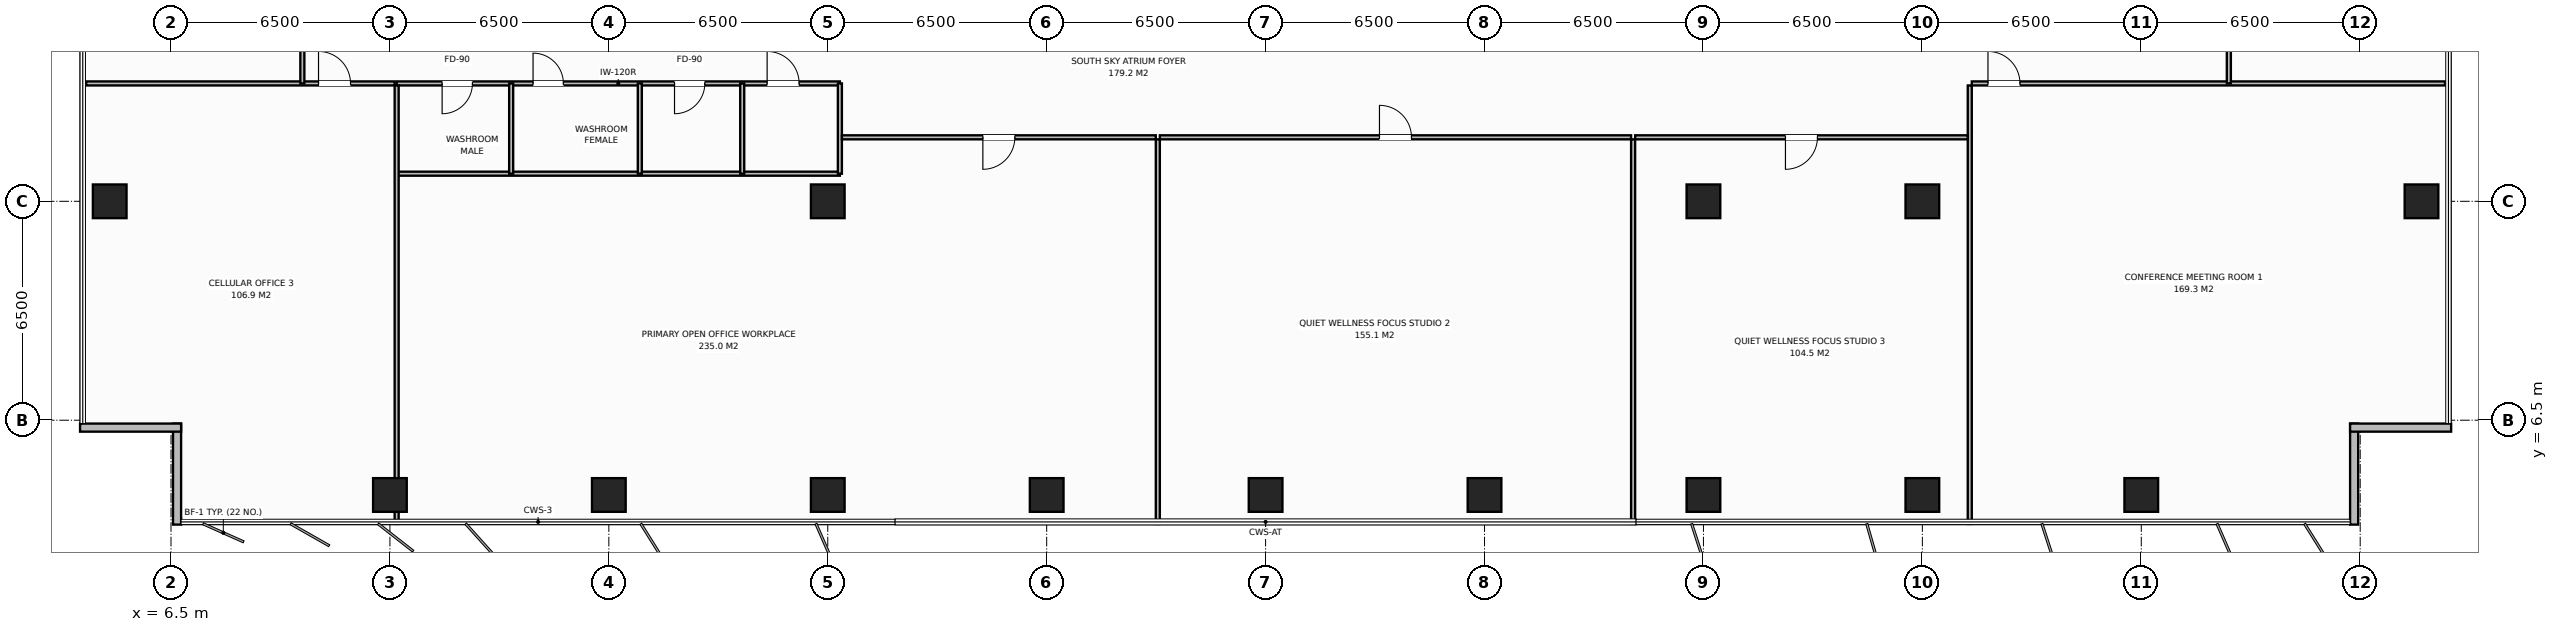
"""IFC4 building model, lengths in metres.
Left out: names, types, materials, properties, quantities, classifications, styles, units other than length and angle.
Written with IfcOpenShell. Run it as: python <this file> out.ifc"""

import sys

from ifc_helpers import new_model, si_unit, direction, frame, frame_2d, origin, origin_2d, place, context, subcontext, project, spatial, rectangle, extrude, element, fill, save


model = new_model("IFC4")
c1 = context("Model", 3, precision=1e-05, world=origin(), true_north=direction((0.0, 1.0)))
c2 = subcontext(c1, "Body", "Model", "MODEL_VIEW")
j1 = project(units=[si_unit("LENGTHUNIT", "METRE"), si_unit("PLANEANGLEUNIT", "RADIAN")], contexts=[c1])
p1 = place(None, origin())
s1 = spatial("IfcSite", under=j1, at=p1, CompositionType="ELEMENT")
p2 = place(p1, origin())
s2 = spatial("IfcBuilding", under=s1, at=p2, CompositionType="ELEMENT")
p3 = place(p2, frame((0.0, 0.0, 155.6)))
s3 = spatial("IfcBuildingStorey", under=s2, at=p3, CompositionType="ELEMENT", Elevation=155.6)
for number, where, z_axis, x_axis in (
    (1, (58.5, 13.0, 0.0), (0.0, 0.0, 1.0), (1.0, 0.0, 0.0)),
    (2, (26.0, 13.0, 0.0), (0.0, 0.0, 1.0), (1.0, 0.0, 0.0)),
    (3, (52.0, 13.0, 0.0), (0.0, 0.0, 1.0), (1.0, 0.0, 0.0)),
    (4, (13.0, 4.28, 0.0), (0.0, 0.0, 1.0), (1.0, 0.0, 0.0)),
    (5, (19.5, 4.28, 0.0), (0.0, 0.0, 1.0), (1.0, 0.0, 0.0)),
    (6, (26.0, 4.28, 0.0), (0.0, 0.0, 1.0), (1.0, 0.0, 0.0)),
    (7, (32.5, 4.28, 0.0), (0.0, 0.0, 1.0), (1.0, 0.0, 0.0)),
    (8, (39.0, 4.28, 0.0), (0.0, 0.0, 1.0), (1.0, 0.0, 0.0)),
    (9, (45.5, 4.28, 0.0), (0.0, 0.0, 1.0), (1.0, 0.0, 0.0)),
    (10, (52.0, 4.28, 0.0), (0.0, 0.0, 1.0), (1.0, 0.0, 0.0)),
    (11, (58.5, 4.28, 0.0), (0.0, 0.0, 1.0), (1.0, 0.0, 0.0)),
    (12, (65.0, 4.28, 0.0), (0.0, 0.0, 1.0), (1.0, 0.0, 0.0)),
    (13, (4.68, 13.0, 0.0), (0.0, 0.0, 1.0), (1.0, 0.0, 0.0)),
    (14, (73.32, 13.0, 0.0), (0.0, 0.0, 1.0), (1.0, 0.0, 0.0)),
):
    element("IfcColumn", number, at=place(p3, frame(where, z_axis=z_axis, x_axis=x_axis)), inside=s3, PredefinedType="COLUMN", context=c2, shape_type="SweptSolid", body=[
        extrude(rectangle(XDim=1.0, YDim=1.0, at=origin_2d()), origin(), (0.0, 0.0, 1.0), 3.8),
    ])
for number, where, z_axis, x_axis in (
    (15, (6.68, 3.4, 0.0), (0.0, 0.0, 1.0), (0.0, 1.0, 0.0)),
    (16, (6.8, 6.28, 0.0), (0.0, 0.0, 1.0), (-1.0, 0.0, 0.0)),
    (17, (71.32, 6.4, 0.0), (0.0, 0.0, 1.0), (0.0, -1.0, 0.0)),
    (18, (74.2, 6.28, 0.0), (0.0, 0.0, 1.0), (-1.0, 0.0, 0.0)),
):
    element("IfcWall", number, at=place(p3, frame(where, z_axis=z_axis, x_axis=x_axis)), inside=s3, PredefinedType="STANDARD", context=c2, shape_type="SweptSolid", body=[
        extrude(rectangle(XDim=3.0, YDim=0.24, at=frame_2d((1.5, 0.0))), origin(), (0.0, 0.0, 1.0), 3.572),
    ])
p4 = place(p3, frame((13.2, 16.5, 0.0), z_axis=(0.0, 0.0, 1.0), x_axis=(1.0, 0.0, 0.0)))
e19 = element("IfcWall", 19, at=p4, inside=s3, PredefinedType="PARTITIONING", context=c2, shape_type="SweptSolid", body=[
    extrude(rectangle(XDim=13.16, YDim=0.12, at=frame_2d((6.58, 0.0))), origin(), (0.0, 0.0, 1.0), 3.572),
])
p5 = place(p4, frame((1.35, 0.0, 0.0)))
e20 = element("IfcOpeningElement", 20, at=p5, cuts=e19, PredefinedType="OPENING", context=c2, shape_type="SweptSolid", body=[
    extrude(rectangle(XDim=0.9, YDim=2.15, at=frame_2d((0.45, 1.075))), frame((0.0, 0.07, 0.0), z_axis=(0.0, -1.0, 0.0), x_axis=(1.0, 0.0, 0.0)), (0.0, 0.0, 1.0), 0.14),
])
p6 = place(p4, frame((4.05, 0.0, 0.0)))
e21 = element("IfcOpeningElement", 21, at=p6, cuts=e19, PredefinedType="OPENING", context=c2, shape_type="SweptSolid", body=[
    extrude(rectangle(XDim=0.9, YDim=2.15, at=frame_2d((0.45, 1.075))), frame((0.0, 0.07, 0.0), z_axis=(0.0, -1.0, 0.0), x_axis=(1.0, 0.0, 0.0)), (0.0, 0.0, 1.0), 0.14),
])
p7 = place(p4, frame((8.25, 0.0, 0.0)))
e22 = element("IfcOpeningElement", 22, at=p7, cuts=e19, PredefinedType="OPENING", context=c2, shape_type="SweptSolid", body=[
    extrude(rectangle(XDim=0.9, YDim=2.15, at=frame_2d((0.45, 1.075))), frame((0.0, 0.07, 0.0), z_axis=(0.0, -1.0, 0.0), x_axis=(1.0, 0.0, 0.0)), (0.0, 0.0, 1.0), 0.14),
])
p8 = place(p4, frame((11.0, 0.0, 0.0)))
e23 = element("IfcOpeningElement", 23, at=p8, cuts=e19, PredefinedType="OPENING", context=c2, shape_type="SweptSolid", body=[
    extrude(rectangle(XDim=0.95, YDim=2.15, at=frame_2d((0.475, 1.075))), frame((0.0, 0.07, 0.0), z_axis=(0.0, -1.0, 0.0), x_axis=(1.0, 0.0, 0.0)), (0.0, 0.0, 1.0), 0.14),
])
p9 = place(p3, frame((13.2, 13.82, 0.0), z_axis=(0.0, 0.0, 1.0), x_axis=(1.0, 0.0, 0.0)))
e24 = element("IfcWall", 24, at=p9, inside=s3, PredefinedType="PARTITIONING", context=c2, shape_type="SweptSolid", body=[
    extrude(rectangle(XDim=13.16, YDim=0.12, at=frame_2d((6.58, 0.0))), origin(), (0.0, 0.0, 1.0), 3.572),
])
for number, where, z_axis, x_axis in (
    (25, (16.6, 13.82, 0.0), (0.0, 0.0, 1.0), (0.0, 1.0, 0.0)),
    (26, (20.42, 13.82, 0.0), (0.0, 0.0, 1.0), (0.0, 1.0, 0.0)),
    (27, (23.46, 13.82, 0.0), (0.0, 0.0, 1.0), (0.0, 1.0, 0.0)),
    (28, (26.36, 13.82, 0.0), (0.0, 0.0, 1.0), (0.0, 1.0, 0.0)),
):
    element("IfcWall", number, at=place(p3, frame(where, z_axis=z_axis, x_axis=x_axis)), inside=s3, PredefinedType="PARTITIONING", context=c2, shape_type="SweptSolid", body=[
        extrude(rectangle(XDim=2.68, YDim=0.12, at=frame_2d((1.34, 0.0))), origin(), (0.0, 0.0, 1.0), 3.572),
    ])
p10 = place(p3, frame((13.2, 3.42, 0.0), z_axis=(0.0, 0.0, 1.0), x_axis=(0.0, 1.0, 0.0)))
e29 = element("IfcWall", 29, at=p10, inside=s3, PredefinedType="PARTITIONING", context=c2, shape_type="SweptSolid", body=[
    extrude(rectangle(XDim=13.02, YDim=0.12, at=frame_2d((6.51, 0.0))), origin(), (0.0, 0.0, 1.0), 3.022),
])
p11 = place(p3, frame((3.98, 16.5, 0.0), z_axis=(0.0, 0.0, 1.0), x_axis=(1.0, 0.0, 0.0)))
e30 = element("IfcWall", 30, at=p11, inside=s3, PredefinedType="PARTITIONING", context=c2, shape_type="SweptSolid", body=[
    extrude(rectangle(XDim=9.16, YDim=0.12, at=frame_2d((4.58, 0.0))), origin(), (0.0, 0.0, 1.0), 3.572),
])
p12 = place(p11, frame((6.9, 0.0, 0.0)))
e31 = element("IfcOpeningElement", 31, at=p12, cuts=e30, PredefinedType="OPENING", context=c2, shape_type="SweptSolid", body=[
    extrude(rectangle(XDim=0.95, YDim=2.15, at=frame_2d((0.475, 1.075))), frame((0.0, 0.07, 0.0), z_axis=(0.0, -1.0, 0.0), x_axis=(1.0, 0.0, 0.0)), (0.0, 0.0, 1.0), 0.14),
])
p13 = place(p3, frame((35.8, 3.42, 0.0), z_axis=(0.0, 0.0, 1.0), x_axis=(0.0, 1.0, 0.0)))
e32 = element("IfcWall", 32, at=p13, inside=s3, PredefinedType="PARTITIONING", context=c2, shape_type="SweptSolid", body=[
    extrude(rectangle(XDim=11.42, YDim=0.12, at=frame_2d((5.71, 0.0))), origin(), (0.0, 0.0, 1.0), 3.572),
])
p14 = place(p3, frame((26.42, 14.9, 0.0), z_axis=(0.0, 0.0, 1.0), x_axis=(1.0, 0.0, 0.0)))
e33 = element("IfcWall", 33, at=p14, inside=s3, PredefinedType="PARTITIONING", context=c2, shape_type="SweptSolid", body=[
    extrude(rectangle(XDim=9.32, YDim=0.12, at=frame_2d((4.66, 0.0))), origin(), (0.0, 0.0, 1.0), 3.572),
])
p15 = place(p14, frame((4.185, 0.0, 0.0)))
e34 = element("IfcOpeningElement", 34, at=p15, cuts=e33, PredefinedType="OPENING", context=c2, shape_type="SweptSolid", body=[
    extrude(rectangle(XDim=0.95, YDim=2.15, at=frame_2d((0.475, 1.075))), frame((0.0, 0.07, 0.0), z_axis=(0.0, -1.0, 0.0), x_axis=(1.0, 0.0, 0.0)), (0.0, 0.0, 1.0), 0.14),
])
p16 = place(p3, frame((49.912, 3.42, 0.0), z_axis=(0.0, 0.0, 1.0), x_axis=(0.0, 1.0, 0.0)))
e35 = element("IfcWall", 35, at=p16, inside=s3, PredefinedType="PARTITIONING", context=c2, shape_type="SweptSolid", body=[
    extrude(rectangle(XDim=11.42, YDim=0.12, at=frame_2d((5.71, 0.0))), origin(), (0.0, 0.0, 1.0), 3.572),
])
p17 = place(p3, frame((35.86, 14.9, 0.0), z_axis=(0.0, 0.0, 1.0), x_axis=(1.0, 0.0, 0.0)))
e36 = element("IfcWall", 36, at=p17, inside=s3, PredefinedType="PARTITIONING", context=c2, shape_type="SweptSolid", body=[
    extrude(rectangle(XDim=13.992, YDim=0.12, at=frame_2d((6.996, 0.0))), origin(), (0.0, 0.0, 1.0), 3.572),
])
p18 = place(p17, frame((6.521, 0.0, 0.0)))
e37 = element("IfcOpeningElement", 37, at=p18, cuts=e36, PredefinedType="OPENING", context=c2, shape_type="SweptSolid", body=[
    extrude(rectangle(XDim=0.95, YDim=2.15, at=frame_2d((0.475, 1.075))), frame((0.0, 0.07, 0.0), z_axis=(0.0, -1.0, 0.0), x_axis=(1.0, 0.0, 0.0)), (0.0, 0.0, 1.0), 0.14),
])
p19 = place(p3, frame((59.908, 3.42, 0.0), z_axis=(0.0, 0.0, 1.0), x_axis=(0.0, 1.0, 0.0)))
e38 = element("IfcWall", 38, at=p19, inside=s3, PredefinedType="PARTITIONING", context=c2, shape_type="SweptSolid", body=[
    extrude(rectangle(XDim=13.02, YDim=0.12, at=frame_2d((6.51, 0.0))), origin(), (0.0, 0.0, 1.0), 3.572),
])
p20 = place(p3, frame((49.972, 14.9, 0.0), z_axis=(0.0, 0.0, 1.0), x_axis=(1.0, 0.0, 0.0)))
e39 = element("IfcWall", 39, at=p20, inside=s3, PredefinedType="PARTITIONING", context=c2, shape_type="SweptSolid", body=[
    extrude(rectangle(XDim=9.876, YDim=0.12, at=frame_2d((4.938, 0.0))), origin(), (0.0, 0.0, 1.0), 3.572),
])
p21 = place(p20, frame((4.463, 0.0, 0.0)))
e40 = element("IfcOpeningElement", 40, at=p21, cuts=e39, PredefinedType="OPENING", context=c2, shape_type="SweptSolid", body=[
    extrude(rectangle(XDim=0.95, YDim=2.15, at=frame_2d((0.475, 1.075))), frame((0.0, 0.07, 0.0), z_axis=(0.0, -1.0, 0.0), x_axis=(1.0, 0.0, 0.0)), (0.0, 0.0, 1.0), 0.14),
])
p22 = place(p3, frame((59.968, 16.5, 0.0), z_axis=(0.0, 0.0, 1.0), x_axis=(1.0, 0.0, 0.0)))
e41 = element("IfcWall", 41, at=p22, inside=s3, PredefinedType="PARTITIONING", context=c2, shape_type="SweptSolid", body=[
    extrude(rectangle(XDim=14.052, YDim=0.12, at=frame_2d((7.026, 0.0))), origin(), (0.0, 0.0, 1.0), 3.572),
])
p23 = place(p22, frame((0.48, 0.0, 0.0)))
e42 = element("IfcOpeningElement", 42, at=p23, cuts=e41, PredefinedType="OPENING", context=c2, shape_type="SweptSolid", body=[
    extrude(rectangle(XDim=0.95, YDim=2.15, at=frame_2d((0.475, 1.075))), frame((0.0, 0.07, 0.0), z_axis=(0.0, -1.0, 0.0), x_axis=(1.0, 0.0, 0.0)), (0.0, 0.0, 1.0), 0.14),
])
p24 = place(p3, frame((10.4, 16.5, 0.0), z_axis=(0.0, 0.0, 1.0), x_axis=(0.0, 1.0, 0.0)))
e43 = element("IfcWall", 43, at=p24, inside=s3, PredefinedType="PARTITIONING", context=c2, shape_type="SweptSolid", body=[
    extrude(rectangle(XDim=6.333, YDim=0.12, at=frame_2d((3.167, 0.0))), origin(), (0.0, 0.0, 1.0), 3.572),
])
p25 = place(p24, frame((3.742, 0.0, 0.0)))
e44 = element("IfcOpeningElement", 44, at=p25, cuts=e43, PredefinedType="OPENING", context=c2, shape_type="SweptSolid", body=[
    extrude(rectangle(XDim=0.95, YDim=2.15, at=frame_2d((0.475, 1.075))), frame((0.0, 0.07, 0.0), z_axis=(0.0, -1.0, 0.0), x_axis=(1.0, 0.0, 0.0)), (0.0, 0.0, 1.0), 0.14),
])
p26 = place(p3, frame((67.6, 16.5, 0.0), z_axis=(0.0, 0.0, 1.0), x_axis=(0.0, 1.0, 0.0)))
e45 = element("IfcWall", 45, at=p26, inside=s3, PredefinedType="PARTITIONING", context=c2, shape_type="SweptSolid", body=[
    extrude(rectangle(XDim=19.0, YDim=0.12, at=frame_2d((9.5, 0.0))), origin(), (0.0, 0.0, 1.0), 3.572),
])
p27 = place(p26, frame((9.025, 0.0, 0.0)))
e46 = element("IfcOpeningElement", 46, at=p27, cuts=e45, PredefinedType="OPENING", context=c2, shape_type="SweptSolid", body=[
    extrude(rectangle(XDim=0.95, YDim=2.15, at=frame_2d((0.475, 1.075))), frame((0.0, 0.07, 0.0), z_axis=(0.0, -1.0, 0.0), x_axis=(1.0, 0.0, 0.0)), (0.0, 0.0, 1.0), 0.14),
])
p28 = place(p5, origin())
e47 = element("IfcDoor", 47, at=p28, inside=s3, OperationType="SINGLE_SWING_RIGHT", PredefinedType="DOOR", context=c2, shape_type="SweptSolid", body=[
    extrude(rectangle(XDim=0.9, YDim=2.15, at=frame_2d((0.45, 1.075))), frame((0.0, 0.025, 0.0), z_axis=(0.0, -1.0, 0.0), x_axis=(1.0, 0.0, 0.0)), (0.0, 0.0, 1.0), 0.05),
])
fill(e20, e47)
p29 = place(p6, origin())
e48 = element("IfcDoor", 48, at=p29, inside=s3, OperationType="SINGLE_SWING_LEFT", PredefinedType="DOOR", context=c2, shape_type="SweptSolid", body=[
    extrude(rectangle(XDim=0.9, YDim=2.15, at=frame_2d((0.45, 1.075))), frame((0.0, 0.025, 0.0), z_axis=(0.0, -1.0, 0.0), x_axis=(1.0, 0.0, 0.0)), (0.0, 0.0, 1.0), 0.05),
])
fill(e21, e48)
p30 = place(p7, origin())
e49 = element("IfcDoor", 49, at=p30, inside=s3, OperationType="SINGLE_SWING_RIGHT", PredefinedType="DOOR", context=c2, shape_type="SweptSolid", body=[
    extrude(rectangle(XDim=0.9, YDim=2.15, at=frame_2d((0.45, 1.075))), frame((0.0, 0.025, 0.0), z_axis=(0.0, -1.0, 0.0), x_axis=(1.0, 0.0, 0.0)), (0.0, 0.0, 1.0), 0.05),
])
fill(e22, e49)
p31 = place(p8, origin())
e50 = element("IfcDoor", 50, at=p31, inside=s3, OperationType="SINGLE_SWING_LEFT", PredefinedType="DOOR", context=c2, shape_type="SweptSolid", body=[
    extrude(rectangle(XDim=0.95, YDim=2.15, at=frame_2d((0.475, 1.075))), frame((0.0, 0.025, 0.0), z_axis=(0.0, -1.0, 0.0), x_axis=(1.0, 0.0, 0.0)), (0.0, 0.0, 1.0), 0.05),
])
fill(e23, e50)
p32 = place(p12, origin())
e51 = element("IfcDoor", 51, at=p32, inside=s3, OperationType="SINGLE_SWING_LEFT", PredefinedType="DOOR", context=c2, shape_type="SweptSolid", body=[
    extrude(rectangle(XDim=0.95, YDim=2.15, at=frame_2d((0.475, 1.075))), frame((0.0, 0.025, 0.0), z_axis=(0.0, -1.0, 0.0), x_axis=(1.0, 0.0, 0.0)), (0.0, 0.0, 1.0), 0.05),
])
fill(e31, e51)
p33 = place(p15, origin())
e52 = element("IfcDoor", 52, at=p33, inside=s3, OperationType="SINGLE_SWING_RIGHT", PredefinedType="DOOR", context=c2, shape_type="SweptSolid", body=[
    extrude(rectangle(XDim=0.95, YDim=2.15, at=frame_2d((0.475, 1.075))), frame((0.0, 0.025, 0.0), z_axis=(0.0, -1.0, 0.0), x_axis=(1.0, 0.0, 0.0)), (0.0, 0.0, 1.0), 0.05),
])
fill(e34, e52)
p34 = place(p18, origin())
e53 = element("IfcDoor", 53, at=p34, inside=s3, OperationType="SINGLE_SWING_LEFT", PredefinedType="DOOR", context=c2, shape_type="SweptSolid", body=[
    extrude(rectangle(XDim=0.95, YDim=2.15, at=frame_2d((0.475, 1.075))), frame((0.0, 0.025, 0.0), z_axis=(0.0, -1.0, 0.0), x_axis=(1.0, 0.0, 0.0)), (0.0, 0.0, 1.0), 0.05),
])
fill(e37, e53)
p35 = place(p21, origin())
e54 = element("IfcDoor", 54, at=p35, inside=s3, OperationType="SINGLE_SWING_RIGHT", PredefinedType="DOOR", context=c2, shape_type="SweptSolid", body=[
    extrude(rectangle(XDim=0.95, YDim=2.15, at=frame_2d((0.475, 1.075))), frame((0.0, 0.025, 0.0), z_axis=(0.0, -1.0, 0.0), x_axis=(1.0, 0.0, 0.0)), (0.0, 0.0, 1.0), 0.05),
])
fill(e40, e54)
p36 = place(p23, origin())
e55 = element("IfcDoor", 55, at=p36, inside=s3, OperationType="SINGLE_SWING_LEFT", PredefinedType="DOOR", context=c2, shape_type="SweptSolid", body=[
    extrude(rectangle(XDim=0.95, YDim=2.15, at=frame_2d((0.475, 1.075))), frame((0.0, 0.025, 0.0), z_axis=(0.0, -1.0, 0.0), x_axis=(1.0, 0.0, 0.0)), (0.0, 0.0, 1.0), 0.05),
])
fill(e42, e55)
save(model, sys.argv[1])
